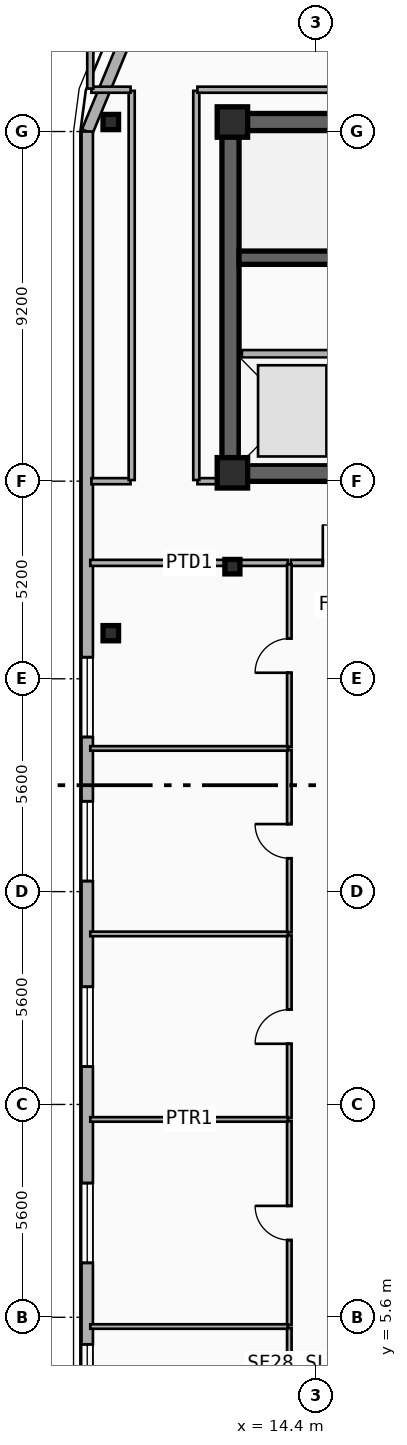
"""IFC4 building model, lengths in metres.
Left out: names, types, materials, properties, quantities, classifications, styles, units other than length and angle.
Written with IfcOpenShell. Run it as: python <this file> out.ifc"""

import sys

from ifc_helpers import new_model, si_unit, direction, frame, frame_2d, origin, origin_2d, place, context, subcontext, project, spatial, rectangle, i_section, extrude, element, fill, save


model = new_model("IFC4")
c1 = context("Model", 3, precision=1e-05, world=origin(), true_north=direction((0.0, 1.0)))
c2 = subcontext(c1, "Body", "Model", "MODEL_VIEW")
j1 = project(units=[si_unit("LENGTHUNIT", "METRE"), si_unit("PLANEANGLEUNIT", "RADIAN")], contexts=[c1])
p1 = place(None, origin())
s1 = spatial("IfcSite", under=j1, at=p1, CompositionType="ELEMENT")
p2 = place(p1, origin())
s2 = spatial("IfcBuilding", under=s1, at=p2, CompositionType="ELEMENT")
p3 = place(p2, frame((0.0, 0.0, 247.3)))
s3 = spatial("IfcBuildingStorey", under=s2, at=p3, CompositionType="ELEMENT", Elevation=247.3)
p4 = place(p3, frame((12.15, 37.05, 0.0), z_axis=(0.0, 0.0, 1.0), x_axis=(1.0, 0.0, 0.0)))
e1 = element("IfcWall", 1, at=p4, inside=s3, PredefinedType="SHEAR", context=c2, shape_type="SweptSolid", body=[
    extrude(rectangle(XDim=33.23, YDim=0.45, at=frame_2d((16.615, 0.0))), origin(), (0.0, 0.0, 1.0), 3.7),
])
p5 = place(p3, frame((21.18, 27.82, 0.0), z_axis=(0.0, 0.0, 1.0), x_axis=(-1.0, 0.0, 0.0)))
e2 = element("IfcWall", 2, at=p5, inside=s3, PredefinedType="SHEAR", context=c2, shape_type="SweptSolid", body=[
    extrude(rectangle(XDim=9.03, YDim=0.45, at=frame_2d((4.515, 0.0))), origin(), (0.0, 0.0, 1.0), 3.7),
])
p6 = place(p5, frame((2.68, 0.0, 0.0)))
e3 = element("IfcOpeningElement", 3, at=p6, cuts=e2, PredefinedType="OPENING", context=c2, shape_type="SweptSolid", body=[
    extrude(rectangle(XDim=1.1, YDim=2.15, at=frame_2d((0.55, 1.075))), frame((0.0, 0.235, 0.0), z_axis=(0.0, -1.0, 0.0), x_axis=(1.0, 0.0, 0.0)), (0.0, 0.0, 1.0), 0.47),
])
p7 = place(p3, frame((12.15, 28.045, 0.0), z_axis=(0.0, 0.0, 1.0), x_axis=(0.0, 1.0, 0.0)))
e4 = element("IfcWall", 4, at=p7, inside=s3, PredefinedType="SHEAR", context=c2, shape_type="SweptSolid", body=[
    extrude(rectangle(XDim=8.78, YDim=0.45, at=frame_2d((4.39, 0.0))), origin(), (0.0, 0.0, 1.0), 3.7),
])
p8 = place(p3, frame((21.005, 33.48, 0.0), z_axis=(0.0, 0.0, 1.0), x_axis=(-1.0, 0.0, 0.0)))
e5 = element("IfcWall", 5, at=p8, inside=s3, PredefinedType="SHEAR", context=c2, shape_type="SweptSolid", body=[
    extrude(rectangle(XDim=8.63, YDim=0.35, at=frame_2d((4.315, 0.0))), origin(), (0.0, 0.0, 1.0), 3.7),
])
p9 = place(p8, frame((0.22, 0.0, 0.0)))
e6 = element("IfcOpeningElement", 6, at=p9, cuts=e5, PredefinedType="OPENING", context=c2, shape_type="SweptSolid", body=[
    extrude(rectangle(XDim=1.1, YDim=2.15, at=frame_2d((0.55, 1.075))), frame((0.0, 0.185, 0.0), z_axis=(0.0, -1.0, 0.0), x_axis=(1.0, 0.0, 0.0)), (0.0, 0.0, 1.0), 0.37),
])
for number, where, z_axis, x_axis in (
    (7, (12.2, 27.82, 0.0), (0.0, 0.0, 1.0), (1.0, 0.0, 0.0)),
    (8, (12.2, 37.05, 0.0), (0.0, 0.0, 1.0), (1.0, 0.0, 0.0)),
):
    element("IfcColumn", number, at=place(p3, frame(where, z_axis=z_axis, x_axis=x_axis)), inside=s3, PredefinedType="COLUMN", context=c2, shape_type="SweptSolid", body=[
        extrude(rectangle(XDim=0.8, YDim=0.8, at=origin_2d()), origin(), (0.0, 0.0, 1.0), 3.7),
    ])
p10 = place(p3, frame((12.2, 25.35, 0.0), z_axis=(0.0, 0.0, 1.0), x_axis=(1.0, 0.0, 0.0)))
e9 = element("IfcColumn", 9, at=p10, inside=s3, PredefinedType="COLUMN", context=c2, shape_type="SweptSolid", body=[
    extrude(i_section(OverallWidth=0.395, OverallDepth=0.38, WebThickness=0.019, FlangeThickness=0.03, FilletRadius=0.015, at=origin_2d()), origin(), (0.0, 0.0, 1.0), 3.7),
])
for number, where, z_axis, x_axis in (
    (10, (9.0, 23.6, 0.0), (0.0, 0.0, 1.0), (1.0, 0.0, 0.0)),
    (11, (9.0, 37.05, 0.0), (0.0, 0.0, 1.0), (1.0, 0.0, 0.0)),
):
    element("IfcColumn", number, at=place(p3, frame(where, z_axis=z_axis, x_axis=x_axis)), inside=s3, PredefinedType="COLUMN", context=c2, shape_type="SweptSolid", body=[
        extrude(i_section(OverallWidth=0.408, OverallDepth=0.4, WebThickness=0.025, FlangeThickness=0.039, FilletRadius=0.015, at=origin_2d()), origin(), (0.0, 0.0, 1.0), 3.7),
    ])
p11 = place(p3, frame((8.38, 36.8, 0.0), z_axis=(0.0, 0.0, 1.0), x_axis=(0.382704529509, 0.923870793506, 0.0)))
e12 = element("IfcWall", 12, at=p11, inside=s3, PredefinedType="SOLIDWALL", context=c2, shape_type="SweptSolid", body=[
    extrude(rectangle(XDim=3.077, YDim=0.3, at=frame_2d((1.538, 0.0))), origin(), (0.0, 0.0, 1.0), 3.42),
])
p12 = place(p3, frame((8.38, 2.6, 0.0), z_axis=(0.0, 0.0, 1.0), x_axis=(0.0, 1.0, 0.0)))
e13 = element("IfcWall", 13, at=p12, inside=s3, PredefinedType="SOLIDWALL", context=c2, shape_type="SweptSolid", body=[
    extrude(rectangle(XDim=34.2, YDim=0.3, at=frame_2d((17.1, 0.0))), origin(), (0.0, 0.0, 1.0), 3.42),
])
p13 = place(p12, frame((0.489, 0.0, 0.8)))
e14 = element("IfcOpeningElement", 14, at=p13, cuts=e13, PredefinedType="OPENING", context=c2, shape_type="SweptSolid", body=[
    extrude(rectangle(XDim=1.8, YDim=1.8, at=frame_2d((0.9, 0.9))), frame((0.0, 0.16, 0.0), z_axis=(0.0, -1.0, 0.0), x_axis=(1.0, 0.0, 0.0)), (0.0, 0.0, 1.0), 0.32),
])
p14 = place(p12, frame((4.431, 0.0, 0.75)))
e15 = element("IfcOpeningElement", 15, at=p14, cuts=e13, PredefinedType="OPENING", context=c2, shape_type="SweptSolid", body=[
    extrude(rectangle(XDim=2.1, YDim=2.1, at=frame_2d((1.05, 1.05))), frame((0.0, 0.16, 0.0), z_axis=(0.0, -1.0, 0.0), x_axis=(1.0, 0.0, 0.0)), (0.0, 0.0, 1.0), 0.32),
])
p15 = place(p12, frame((9.596, 0.0, 0.75)))
e16 = element("IfcOpeningElement", 16, at=p15, cuts=e13, PredefinedType="OPENING", context=c2, shape_type="SweptSolid", body=[
    extrude(rectangle(XDim=2.1, YDim=2.1, at=frame_2d((1.05, 1.05))), frame((0.0, 0.16, 0.0), z_axis=(0.0, -1.0, 0.0), x_axis=(1.0, 0.0, 0.0)), (0.0, 0.0, 1.0), 0.32),
])
p16 = place(p12, frame((14.478, 0.0, 0.75)))
e17 = element("IfcOpeningElement", 17, at=p16, cuts=e13, PredefinedType="OPENING", context=c2, shape_type="SweptSolid", body=[
    extrude(rectangle(XDim=2.1, YDim=2.1, at=frame_2d((1.05, 1.05))), frame((0.0, 0.16, 0.0), z_axis=(0.0, -1.0, 0.0), x_axis=(1.0, 0.0, 0.0)), (0.0, 0.0, 1.0), 0.32),
])
p17 = place(p12, frame((18.268, 0.0, 0.75)))
e18 = element("IfcOpeningElement", 18, at=p17, cuts=e13, PredefinedType="OPENING", context=c2, shape_type="SweptSolid", body=[
    extrude(rectangle(XDim=2.1, YDim=2.1, at=frame_2d((1.05, 1.05))), frame((0.0, 0.16, 0.0), z_axis=(0.0, -1.0, 0.0), x_axis=(1.0, 0.0, 0.0)), (0.0, 0.0, 1.0), 0.32),
])
p18 = place(p3, frame((12.45, 30.95, 0.0), z_axis=(0.0, 0.0, 1.0), x_axis=(1.0, 0.0, 0.0)))
e19 = element("IfcWall", 19, at=p18, inside=s3, PredefinedType="PARTITIONING", context=c2, shape_type="SweptSolid", body=[
    extrude(rectangle(XDim=2.75, YDim=0.2, at=frame_2d((1.375, 0.0))), origin(), (0.0, 0.0, 1.0), 2.49),
])
p19 = place(p3, frame((13.738, 25.45, 0.0), z_axis=(0.0, 0.0, 1.0), x_axis=(1.0, 0.0, 0.0)))
e20 = element("IfcWall", 20, at=p19, inside=s3, PredefinedType="PARTITIONING", context=c2, shape_type="SweptSolid", body=[
    extrude(rectangle(XDim=2.682, YDim=0.16, at=frame_2d((1.341, 0.0))), origin(), (0.0, 0.0, 1.0), 3.42),
])
p20 = place(p19, frame((0.841, 0.0, 0.0)))
e21 = element("IfcOpeningElement", 21, at=p20, cuts=e20, PredefinedType="OPENING", context=c2, shape_type="SweptSolid", body=[
    extrude(rectangle(XDim=1.0, YDim=2.15, at=frame_2d((0.5, 1.075))), frame((0.0, 0.09, 0.0), z_axis=(0.0, -1.0, 0.0), x_axis=(1.0, 0.0, 0.0)), (0.0, 0.0, 1.0), 0.18),
])
p21 = place(p3, frame((8.46, 25.45, 0.0), z_axis=(0.0, 0.0, 1.0), x_axis=(1.0, 0.0, 0.0)))
e22 = element("IfcWall", 22, at=p21, inside=s3, PredefinedType="PARTITIONING", context=c2, shape_type="SweptSolid", body=[
    extrude(rectangle(XDim=5.198, YDim=0.16, at=frame_2d((2.599, 0.0))), origin(), (0.0, 0.0, 1.0), 2.7),
])
p22 = place(p3, frame((13.698, -1.34, 0.0), z_axis=(0.0, 0.0, 1.0), x_axis=(0.0, 1.0, 0.0)))
e23 = element("IfcWall", 23, at=p22, inside=s3, PredefinedType="PARTITIONING", context=c2, shape_type="SweptSolid", body=[
    extrude(rectangle(XDim=6.657, YDim=0.12, at=frame_2d((3.329, 0.0))), origin(), (0.0, 0.0, 1.0), 3.08),
])
p23 = place(p22, frame((2.878, 0.0, 0.0)))
e24 = element("IfcOpeningElement", 24, at=p23, cuts=e23, PredefinedType="OPENING", context=c2, shape_type="SweptSolid", body=[
    extrude(rectangle(XDim=0.9, YDim=2.1, at=frame_2d((0.45, 1.05))), frame((0.0, 0.07, 0.0), z_axis=(0.0, -1.0, 0.0), x_axis=(1.0, 0.0, 0.0)), (0.0, 0.0, 1.0), 0.14),
])
p24 = place(p3, frame((13.698, 5.397, 0.0), z_axis=(0.0, 0.0, 1.0), x_axis=(0.0, 1.0, 0.0)))
e25 = element("IfcWall", 25, at=p24, inside=s3, PredefinedType="PARTITIONING", context=c2, shape_type="SweptSolid", body=[
    extrude(rectangle(XDim=5.369, YDim=0.12, at=frame_2d((2.685, 0.0))), origin(), (0.0, 0.0, 1.0), 3.05),
])
p25 = place(p24, frame((2.235, 0.0, 0.0)))
e26 = element("IfcOpeningElement", 26, at=p25, cuts=e25, PredefinedType="OPENING", context=c2, shape_type="SweptSolid", body=[
    extrude(rectangle(XDim=0.9, YDim=2.1, at=frame_2d((0.45, 1.05))), frame((0.0, 0.07, 0.0), z_axis=(0.0, -1.0, 0.0), x_axis=(1.0, 0.0, 0.0)), (0.0, 0.0, 1.0), 0.14),
])
p26 = place(p3, frame((13.698, 10.846, 0.0), z_axis=(0.0, 0.0, 1.0), x_axis=(0.0, 1.0, 0.0)))
e27 = element("IfcWall", 27, at=p26, inside=s3, PredefinedType="PARTITIONING", context=c2, shape_type="SweptSolid", body=[
    extrude(rectangle(XDim=4.801, YDim=0.12, at=frame_2d((2.4, 0.0))), origin(), (0.0, 0.0, 1.0), 2.9),
])
p27 = place(p26, frame((1.95, 0.0, 0.0)))
e28 = element("IfcOpeningElement", 28, at=p27, cuts=e27, PredefinedType="OPENING", context=c2, shape_type="SweptSolid", body=[
    extrude(rectangle(XDim=0.9, YDim=2.1, at=frame_2d((0.45, 1.05))), frame((0.0, 0.07, 0.0), z_axis=(0.0, -1.0, 0.0), x_axis=(1.0, 0.0, 0.0)), (0.0, 0.0, 1.0), 0.14),
])
p28 = place(p3, frame((13.698, 15.727, 0.0), z_axis=(0.0, 0.0, 1.0), x_axis=(0.0, 1.0, 0.0)))
e29 = element("IfcWall", 29, at=p28, inside=s3, PredefinedType="PARTITIONING", context=c2, shape_type="SweptSolid", body=[
    extrude(rectangle(XDim=4.801, YDim=0.12, at=frame_2d((2.4, 0.0))), origin(), (0.0, 0.0, 1.0), 2.9),
])
p29 = place(p28, frame((1.95, 0.0, 0.0)))
e30 = element("IfcOpeningElement", 30, at=p29, cuts=e29, PredefinedType="OPENING", context=c2, shape_type="SweptSolid", body=[
    extrude(rectangle(XDim=0.9, YDim=2.1, at=frame_2d((0.45, 1.05))), frame((0.0, 0.07, 0.0), z_axis=(0.0, -1.0, 0.0), x_axis=(1.0, 0.0, 0.0)), (0.0, 0.0, 1.0), 0.14),
])
p30 = place(p3, frame((13.698, 20.608, 0.0), z_axis=(0.0, 0.0, 1.0), x_axis=(0.0, 1.0, 0.0)))
e31 = element("IfcWall", 31, at=p30, inside=s3, PredefinedType="PARTITIONING", context=c2, shape_type="SweptSolid", body=[
    extrude(rectangle(XDim=4.802, YDim=0.12, at=frame_2d((2.401, 0.0))), origin(), (0.0, 0.0, 1.0), 3.05),
])
p31 = place(p30, frame((1.951, 0.0, 0.0)))
e32 = element("IfcOpeningElement", 32, at=p31, cuts=e31, PredefinedType="OPENING", context=c2, shape_type="SweptSolid", body=[
    extrude(rectangle(XDim=0.9, YDim=2.1, at=frame_2d((0.45, 1.05))), frame((0.0, 0.07, 0.0), z_axis=(0.0, -1.0, 0.0), x_axis=(1.0, 0.0, 0.0)), (0.0, 0.0, 1.0), 0.14),
])
for number, where, z_axis, x_axis in (
    (33, (8.46, 5.357, 0.0), (0.0, 0.0, 1.0), (1.0, 0.0, 0.0)),
    (34, (8.46, 10.806, 0.0), (0.0, 0.0, 1.0), (1.0, 0.0, 0.0)),
    (35, (8.46, 15.687, 0.0), (0.0, 0.0, 1.0), (1.0, 0.0, 0.0)),
    (36, (8.46, 20.568, 0.0), (0.0, 0.0, 1.0), (1.0, 0.0, 0.0)),
):
    element("IfcWall", number, at=place(p3, frame(where, z_axis=z_axis, x_axis=x_axis)), inside=s3, PredefinedType="PARTITIONING", context=c2, shape_type="SweptSolid", body=[
        extrude(rectangle(XDim=5.198, YDim=0.12, at=frame_2d((2.599, 0.0))), origin(), (0.0, 0.0, 1.0), 2.7),
    ])
p32 = place(p3, frame((8.49, 27.6, 0.0), z_axis=(0.0, 0.0, 1.0), x_axis=(1.0, 0.0, 0.0)))
e37 = element("IfcWall", 37, at=p32, inside=s3, PredefinedType="PARTITIONING", context=c2, shape_type="SweptSolid", body=[
    extrude(rectangle(XDim=1.03, YDim=0.16, at=frame_2d((0.515, 0.0))), origin(), (0.0, 0.0, 1.0), 3.42),
])
p33 = place(p3, frame((11.28, 27.6, 0.0), z_axis=(0.0, 0.0, 1.0), x_axis=(1.0, 0.0, 0.0)))
e38 = element("IfcWall", 38, at=p33, inside=s3, PredefinedType="PARTITIONING", context=c2, shape_type="SweptSolid", body=[
    extrude(rectangle(XDim=0.84, YDim=0.16, at=frame_2d((0.42, 0.0))), origin(), (0.0, 0.0, 1.0), 2.49),
])
for number, where, z_axis, x_axis in (
    (39, (9.55, 27.63, 0.0), (0.0, 0.0, 1.0), (0.0, 1.0, 0.0)),
    (40, (11.25, 27.63, 0.0), (0.0, 0.0, 1.0), (0.0, 1.0, 0.0)),
):
    element("IfcWall", number, at=place(p3, frame(where, z_axis=z_axis, x_axis=x_axis)), inside=s3, PredefinedType="PARTITIONING", context=c2, shape_type="SweptSolid", body=[
        extrude(rectangle(XDim=10.24, YDim=0.16, at=frame_2d((5.12, 0.0))), origin(), (0.0, 0.0, 1.0), 2.9),
    ])
p34 = place(p3, frame((8.49, 37.9, 0.0), z_axis=(0.0, 0.0, 1.0), x_axis=(1.0, 0.0, 0.0)))
e41 = element("IfcWall", 41, at=p34, inside=s3, PredefinedType="PARTITIONING", context=c2, shape_type="SweptSolid", body=[
    extrude(rectangle(XDim=1.03, YDim=0.16, at=frame_2d((0.515, 0.0))), origin(), (0.0, 0.0, 1.0), 3.42),
])
p35 = place(p3, frame((11.28, 37.9, 0.0), z_axis=(0.0, 0.0, 1.0), x_axis=(1.0, 0.0, 0.0)))
e42 = element("IfcWall", 42, at=p35, inside=s3, PredefinedType="PARTITIONING", context=c2, shape_type="SweptSolid", body=[
    extrude(rectangle(XDim=35.04, YDim=0.16, at=frame_2d((17.52, 0.0))), origin(), (0.0, 0.0, 1.0), 3.42),
])
p36 = place(p3, frame((8.46, 37.93, 0.0), z_axis=(0.0, 0.0, 1.0), x_axis=(0.0, 1.0, 0.0)))
e43 = element("IfcWall", 43, at=p36, inside=s3, PredefinedType="PARTITIONING", context=c2, shape_type="SweptSolid", body=[
    extrude(rectangle(XDim=1.44, YDim=0.16, at=frame_2d((0.72, 0.0))), origin(), (0.0, 0.0, 1.0), 3.42),
])
p37 = place(p13, origin())
e44 = element("IfcWindow", 44, at=p37, inside=s3, PartitioningType="SINGLE_PANEL", PredefinedType="WINDOW", context=c2, shape_type="SweptSolid", body=[
    extrude(rectangle(XDim=1.8, YDim=1.8, at=frame_2d((0.9, 0.9))), frame((0.0, 0.03, 0.0), z_axis=(0.0, -1.0, 0.0), x_axis=(1.0, 0.0, 0.0)), (0.0, 0.0, 1.0), 0.06),
])
fill(e14, e44)
p38 = place(p14, origin())
e45 = element("IfcWindow", 45, at=p38, inside=s3, PartitioningType="SINGLE_PANEL", PredefinedType="WINDOW", context=c2, shape_type="SweptSolid", body=[
    extrude(rectangle(XDim=2.1, YDim=2.1, at=frame_2d((1.05, 1.05))), frame((0.0, 0.03, 0.0), z_axis=(0.0, -1.0, 0.0), x_axis=(1.0, 0.0, 0.0)), (0.0, 0.0, 1.0), 0.06),
])
fill(e15, e45)
p39 = place(p15, origin())
e46 = element("IfcWindow", 46, at=p39, inside=s3, PartitioningType="SINGLE_PANEL", PredefinedType="WINDOW", context=c2, shape_type="SweptSolid", body=[
    extrude(rectangle(XDim=2.1, YDim=2.1, at=frame_2d((1.05, 1.05))), frame((0.0, 0.03, 0.0), z_axis=(0.0, -1.0, 0.0), x_axis=(1.0, 0.0, 0.0)), (0.0, 0.0, 1.0), 0.06),
])
fill(e16, e46)
p40 = place(p16, origin())
e47 = element("IfcWindow", 47, at=p40, inside=s3, PartitioningType="SINGLE_PANEL", PredefinedType="WINDOW", context=c2, shape_type="SweptSolid", body=[
    extrude(rectangle(XDim=2.1, YDim=2.1, at=frame_2d((1.05, 1.05))), frame((0.0, 0.03, 0.0), z_axis=(0.0, -1.0, 0.0), x_axis=(1.0, 0.0, 0.0)), (0.0, 0.0, 1.0), 0.06),
])
fill(e17, e47)
p41 = place(p17, origin())
e48 = element("IfcWindow", 48, at=p41, inside=s3, PartitioningType="SINGLE_PANEL", PredefinedType="WINDOW", context=c2, shape_type="SweptSolid", body=[
    extrude(rectangle(XDim=2.1, YDim=2.1, at=frame_2d((1.05, 1.05))), frame((0.0, 0.03, 0.0), z_axis=(0.0, -1.0, 0.0), x_axis=(1.0, 0.0, 0.0)), (0.0, 0.0, 1.0), 0.06),
])
fill(e18, e48)
p42 = place(p20, origin())
e49 = element("IfcDoor", 49, at=p42, inside=s3, OperationType="SINGLE_SWING_LEFT", PredefinedType="DOOR", context=c2, shape_type="SweptSolid", body=[
    extrude(rectangle(XDim=1.0, YDim=2.15, at=frame_2d((0.5, 1.075))), frame((0.0, 0.025, 0.0), z_axis=(0.0, -1.0, 0.0), x_axis=(1.0, 0.0, 0.0)), (0.0, 0.0, 1.0), 0.05),
])
fill(e21, e49)
p43 = place(p25, origin())
e50 = element("IfcDoor", 50, at=p43, inside=s3, OperationType="SINGLE_SWING_RIGHT", PredefinedType="DOOR", context=c2, shape_type="SweptSolid", body=[
    extrude(rectangle(XDim=0.9, YDim=2.1, at=frame_2d((0.45, 1.05))), frame((0.0, 0.025, 0.0), z_axis=(0.0, -1.0, 0.0), x_axis=(1.0, 0.0, 0.0)), (0.0, 0.0, 1.0), 0.05),
])
fill(e26, e50)
p44 = place(p27, origin())
e51 = element("IfcDoor", 51, at=p44, inside=s3, OperationType="SINGLE_SWING_LEFT", PredefinedType="DOOR", context=c2, shape_type="SweptSolid", body=[
    extrude(rectangle(XDim=0.9, YDim=2.1, at=frame_2d((0.45, 1.05))), frame((0.0, 0.025, 0.0), z_axis=(0.0, -1.0, 0.0), x_axis=(1.0, 0.0, 0.0)), (0.0, 0.0, 1.0), 0.05),
])
fill(e28, e51)
p45 = place(p29, origin())
e52 = element("IfcDoor", 52, at=p45, inside=s3, OperationType="SINGLE_SWING_RIGHT", PredefinedType="DOOR", context=c2, shape_type="SweptSolid", body=[
    extrude(rectangle(XDim=0.9, YDim=2.1, at=frame_2d((0.45, 1.05))), frame((0.0, 0.025, 0.0), z_axis=(0.0, -1.0, 0.0), x_axis=(1.0, 0.0, 0.0)), (0.0, 0.0, 1.0), 0.05),
])
fill(e30, e52)
p46 = place(p31, origin())
e53 = element("IfcDoor", 53, at=p46, inside=s3, OperationType="SINGLE_SWING_LEFT", PredefinedType="DOOR", context=c2, shape_type="SweptSolid", body=[
    extrude(rectangle(XDim=0.9, YDim=2.1, at=frame_2d((0.45, 1.05))), frame((0.0, 0.025, 0.0), z_axis=(0.0, -1.0, 0.0), x_axis=(1.0, 0.0, 0.0)), (0.0, 0.0, 1.0), 0.05),
])
fill(e32, e53)
save(model, sys.argv[1])
